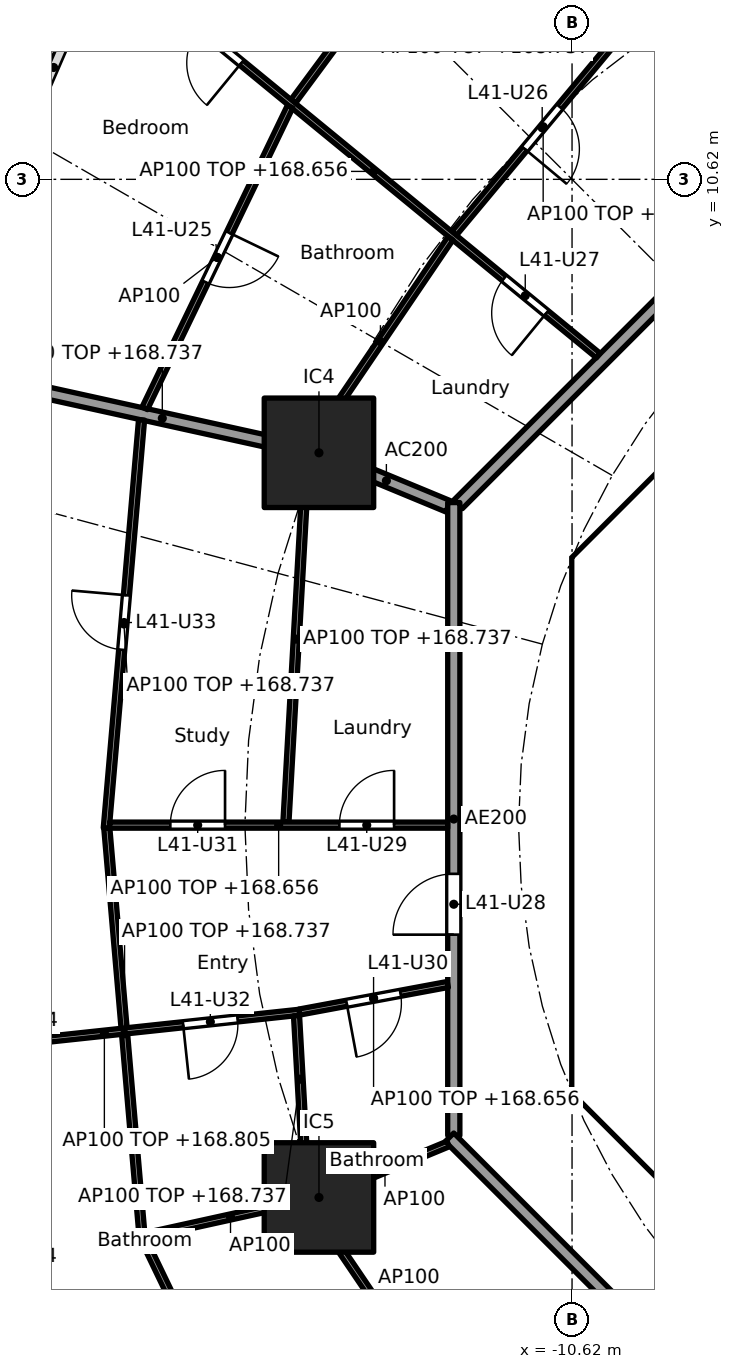
"""IFC4 building model, lengths in metres.
Left out: names, types, materials, properties, quantities, classifications, styles, units other than length and angle.
Written with IfcOpenShell. Run it as: python <this file> out.ifc"""

import sys

from ifc_helpers import new_model, si_unit, direction, frame, frame_2d, origin, origin_2d, place, context, subcontext, project, spatial, polyline, rectangle, outline, extrude, element, fill, save


model = new_model("IFC4")
c1 = context("Model", 3, precision=1e-05, world=origin(), true_north=direction((0.0, 1.0)))
c2 = subcontext(c1, "Body", "Model", "MODEL_VIEW")
j1 = project(units=[si_unit("LENGTHUNIT", "METRE"), si_unit("PLANEANGLEUNIT", "RADIAN")], contexts=[c1])
p1 = place(None, origin())
s1 = spatial("IfcSite", under=j1, at=p1, CompositionType="ELEMENT")
p2 = place(p1, origin())
s2 = spatial("IfcBuilding", under=s1, at=p2, CompositionType="ELEMENT")
p3 = place(p2, frame((0.0, 0.0, 165.9)))
s3 = spatial("IfcBuildingStorey", under=s2, at=p3, CompositionType="ELEMENT", Elevation=165.9)
for number, where, z_axis, x_axis in (
    (1, (-14.782, 6.123, 0.0), (0.0, 0.0, 1.0), (1.0, 0.0, 0.0)),
    (2, (-14.782, -6.123, 0.0), (0.0, 0.0, 1.0), (1.0, 0.0, 0.0)),
):
    element("IfcColumn", number, at=place(p3, frame(where, z_axis=z_axis, x_axis=x_axis)), inside=s3, PredefinedType="COLUMN", context=c2, shape_type="SweptSolid", body=[
        extrude(rectangle(XDim=1.8, YDim=1.8, at=origin_2d()), origin(), (0.0, 0.0, 1.0), 3.7),
    ])
p4 = place(p3, frame((-18.227, 16.86, 0.0), z_axis=(0.0, 0.0, 1.0), x_axis=(-0.467931103726, -0.883764947351, 0.0)))
e3 = element("IfcWall", 3, at=p4, inside=s3, PredefinedType="SOLIDWALL", context=c2, shape_type="SweptSolid", body=[
    extrude(rectangle(XDim=5.947, YDim=1.6, at=frame_2d((2.973, 0.0))), origin(), (0.0, 0.0, 1.0), 1.1),
])
p5 = place(p3, frame((-4.613, 9.988, 0.0), z_axis=(0.0, 0.0, 1.0), x_axis=(-0.707106781187, -0.707106781187, 0.0)))
e4 = element("IfcWall", 4, at=p5, inside=s3, PredefinedType="SHEAR", context=c2, shape_type="SweptSolid", body=[
    extrude(rectangle(XDim=7.602, YDim=0.6, at=frame_2d((3.801, 0.0))), origin(), (0.0, 0.0, 1.0), 3.44),
])
p6 = place(p5, frame((0.351, 0.0, 0.0)))
e5 = element("IfcOpeningElement", 5, at=p6, cuts=e4, PredefinedType="OPENING", context=c2, shape_type="SweptSolid", body=[
    extrude(rectangle(XDim=1.1, YDim=2.1, at=frame_2d((0.55, 1.05))), frame((0.0, 0.31, 0.0), z_axis=(0.0, -1.0, 0.0), x_axis=(1.0, 0.0, 0.0)), (0.0, 0.0, 1.0), 0.62),
])
p7 = place(p3, frame((-10.325, 3.801, 0.0), z_axis=(0.0, 0.0, 1.0), x_axis=(0.0, -1.0, 0.0)))
e6 = element("IfcWall", 6, at=p7, inside=s3, PredefinedType="SHEAR", context=c2, shape_type="SweptSolid", body=[
    extrude(rectangle(XDim=7.602, YDim=0.6, at=frame_2d((3.801, 0.0))), origin(), (0.0, 0.0, 1.0), 3.44),
])
p8 = place(p7, frame((0.651, 0.0, 0.0)))
e7 = element("IfcOpeningElement", 7, at=p8, cuts=e6, PredefinedType="OPENING", context=c2, shape_type="SweptSolid", body=[
    extrude(rectangle(XDim=1.5, YDim=2.1, at=frame_2d((0.75, 1.05))), frame((0.0, 0.31, 0.0), z_axis=(0.0, -1.0, 0.0), x_axis=(1.0, 0.0, 0.0)), (0.0, 0.0, 1.0), 0.62),
])
p9 = place(p7, frame((5.451, 0.0, 0.0)))
e8 = element("IfcOpeningElement", 8, at=p9, cuts=e6, PredefinedType="OPENING", context=c2, shape_type="SweptSolid", body=[
    extrude(rectangle(XDim=1.5, YDim=2.1, at=frame_2d((0.75, 1.05))), frame((0.0, 0.31, 0.0), z_axis=(0.0, -1.0, 0.0), x_axis=(1.0, 0.0, 0.0)), (0.0, 0.0, 1.0), 0.62),
])
p10 = place(p3, frame((-9.988, -4.613, 0.0), z_axis=(0.0, 0.0, 1.0), x_axis=(0.707106781187, -0.707106781187, 0.0)))
e9 = element("IfcWall", 9, at=p10, inside=s3, PredefinedType="SHEAR", context=c2, shape_type="SweptSolid", body=[
    extrude(rectangle(XDim=7.602, YDim=0.6, at=frame_2d((3.801, 0.0))), origin(), (0.0, 0.0, 1.0), 3.44),
])
p11 = place(p10, frame((6.151, 0.0, 0.0)))
e10 = element("IfcOpeningElement", 10, at=p11, cuts=e9, PredefinedType="OPENING", context=c2, shape_type="SweptSolid", body=[
    extrude(rectangle(XDim=1.1, YDim=2.1, at=frame_2d((0.55, 1.05))), frame((0.0, 0.31, 0.0), z_axis=(0.0, -1.0, 0.0), x_axis=(1.0, 0.0, 0.0)), (0.0, 0.0, 1.0), 0.62),
])
p12 = place(p3, origin())
e11 = element("IfcWall", 11, at=p12, inside=s3, PredefinedType="SHEAR", context=c2, shape_type="SweptSolid", body=[
    extrude(outline(polyline([(-10.625, -3.801), (-10.025, -3.801), (-10.025, -4.152), (-9.776, -4.401), (-10.2, -4.825), (-10.625, -4.401), (-10.625, -3.801)])), origin(), (0.0, 0.0, 1.0), 3.44),
])
p13 = place(p3, origin())
e12 = element("IfcWall", 12, at=p13, inside=s3, PredefinedType="SHEAR", context=c2, shape_type="SweptSolid", body=[
    extrude(outline(polyline([(-10.2, 4.825), (-9.776, 4.401), (-10.025, 4.152), (-10.025, 3.801), (-10.625, 3.801), (-10.625, 4.401), (-10.2, 4.825)])), origin(), (0.0, 0.0, 1.0), 3.44),
])
for number, where, z_axis, x_axis in (
    (13, (-10.025, -4.0, 0.0), (0.0, 0.0, 1.0), (1.0, 0.0, 0.0)),
    (14, (-10.025, 4.0, 0.0), (0.0, 0.0, 1.0), (1.0, 0.0, 0.0)),
):
    element("IfcWall", number, at=place(p3, frame(where, z_axis=z_axis, x_axis=x_axis)), inside=s3, PredefinedType="PARTITIONING", context=c2, shape_type="SweptSolid", body=[
        extrude(rectangle(XDim=3.325, YDim=0.2, at=frame_2d((1.662, 0.0))), origin(), (0.0, 0.0, 1.0), 3.44),
    ])
p14 = place(p3, frame((-12.657, 5.243, 0.0), z_axis=(0.0, 0.0, 1.0), x_axis=(-0.923859888513, 0.38273085373, 0.0)))
e15 = element("IfcWall", 15, at=p14, inside=s3, PredefinedType="PARTITIONING", context=c2, shape_type="SweptSolid", body=[
    extrude(rectangle(XDim=2.199, YDim=0.2, at=frame_2d((1.1, 0.0))), origin(), (0.0, 0.0, 1.0), 3.44),
])
p15 = place(p3, frame((-14.831, 6.134, 0.0), z_axis=(0.0, 0.0, 1.0), x_axis=(-0.976568396888, 0.215207263354, 0.0)))
e16 = element("IfcWall", 16, at=p15, inside=s3, PredefinedType="PARTITIONING", context=c2, shape_type="SweptSolid", body=[
    extrude(rectangle(XDim=5.177, YDim=0.2, at=frame_2d((2.588, 0.0))), origin(), (0.0, 0.0, 1.0), 2.837),
])
p16 = place(p3, frame((-5.275, 12.494, 0.0), z_axis=(0.0, 0.0, 1.0), x_axis=(-0.707106781187, -0.707106781187, 0.0)))
e17 = element("IfcWall", 17, at=p16, inside=s3, PredefinedType="PARTITIONING", context=c2, shape_type="SweptSolid", body=[
    extrude(rectangle(XDim=10.209, YDim=0.2, at=frame_2d((5.104, 0.0))), origin(), (0.0, 0.0, 1.0), 3.44),
])
p17 = place(p3, frame((-12.565, 5.304, 0.0), z_axis=(0.0, 0.0, 1.0), x_axis=(0.0, -1.0, 0.0)))
e18 = element("IfcWall", 18, at=p17, inside=s3, PredefinedType="PARTITIONING", context=c2, shape_type="SweptSolid", body=[
    extrude(rectangle(XDim=10.409, YDim=0.2, at=frame_2d((5.205, 0.0))), origin(), (0.0, 0.0, 1.0), 3.44),
])
p18 = place(p17, frame((6.106, 0.0, 0.0)))
e19 = element("IfcOpeningElement", 19, at=p18, cuts=e18, PredefinedType="OPENING", context=c2, shape_type="SweptSolid", body=[
    extrude(rectangle(XDim=1.0, YDim=2.1, at=frame_2d((0.5, 1.05))), frame((0.0, 0.11, 0.0), z_axis=(0.0, -1.0, 0.0), x_axis=(1.0, 0.0, 0.0)), (0.0, 0.0, 1.0), 0.22),
])
p19 = place(p3, frame((-12.635, -5.134, 0.0), z_axis=(0.0, 0.0, 1.0), x_axis=(0.707106781187, -0.707106781187, 0.0)))
e20 = element("IfcWall", 20, at=p19, inside=s3, PredefinedType="PARTITIONING", context=c2, shape_type="SweptSolid", body=[
    extrude(rectangle(XDim=10.609, YDim=0.2, at=frame_2d((5.305, 0.0))), origin(), (0.0, 0.0, 1.0), 3.44),
])
p20 = place(p3, frame((-9.631, 13.242, 0.0), z_axis=(0.0, 0.0, 1.0), x_axis=(-0.640315711982, -0.768111833647, 0.0)))
e21 = element("IfcWall", 21, at=p20, inside=s3, PredefinedType="PARTITIONING", context=c2, shape_type="SweptSolid", body=[
    extrude(rectangle(XDim=4.572, YDim=0.1, at=frame_2d((2.286, 0.0))), origin(), (0.0, 0.0, 1.0), 2.837),
])
p21 = place(p20, frame((1.861, 0.0, 0.0)))
e22 = element("IfcOpeningElement", 22, at=p21, cuts=e21, PredefinedType="OPENING", context=c2, shape_type="SweptSolid", body=[
    extrude(rectangle(XDim=0.9, YDim=2.1, at=frame_2d((0.45, 1.05))), frame((0.0, 0.06, 0.0), z_axis=(0.0, -1.0, 0.0), x_axis=(1.0, 0.0, 0.0)), (0.0, 0.0, 1.0), 0.12),
])
p22 = place(p3, frame((-11.773, 16.542, 0.0), z_axis=(0.0, 0.0, 1.0), x_axis=(-0.594694305999, -0.803951915485, 0.0)))
e23 = element("IfcWall", 23, at=p22, inside=s3, PredefinedType="PARTITIONING", context=c2, shape_type="SweptSolid", body=[
    extrude(rectangle(XDim=5.772, YDim=0.1, at=frame_2d((2.886, 0.0))), origin(), (0.0, 0.0, 1.0), 2.837),
])
p23 = place(p22, frame((2.461, 0.0, 0.0)))
e24 = element("IfcOpeningElement", 24, at=p23, cuts=e23, PredefinedType="OPENING", context=c2, shape_type="SweptSolid", body=[
    extrude(rectangle(XDim=0.9, YDim=2.1, at=frame_2d((0.45, 1.05))), frame((0.0, 0.06, 0.0), z_axis=(0.0, -1.0, 0.0), x_axis=(1.0, 0.0, 0.0)), (0.0, 0.0, 1.0), 0.12),
])
p24 = place(p3, frame((-10.189, 7.721, 0.0), z_axis=(0.0, 0.0, 1.0), x_axis=(-0.773134429339, 0.634242188892, 0.0)))
e25 = element("IfcWall", 25, at=p24, inside=s3, PredefinedType="PARTITIONING", context=c2, shape_type="SweptSolid", body=[
    extrude(rectangle(XDim=9.552, YDim=0.1, at=frame_2d((4.776, 0.0))), origin(), (0.0, 0.0, 1.0), 2.756),
])
p25 = place(p24, frame((7.59, 0.0, 0.0)))
e26 = element("IfcOpeningElement", 26, at=p25, cuts=e25, PredefinedType="OPENING", context=c2, shape_type="SweptSolid", body=[
    extrude(rectangle(XDim=0.9, YDim=2.1, at=frame_2d((0.45, 1.05))), frame((0.0, 0.06, 0.0), z_axis=(0.0, -1.0, 0.0), x_axis=(1.0, 0.0, 0.0)), (0.0, 0.0, 1.0), 0.12),
])
p26 = place(p24, frame((1.104, 0.0, 0.0)))
e27 = element("IfcOpeningElement", 27, at=p26, cuts=e25, PredefinedType="OPENING", context=c2, shape_type="SweptSolid", body=[
    extrude(rectangle(XDim=0.9, YDim=2.1, at=frame_2d((0.45, 1.05))), frame((0.0, 0.06, 0.0), z_axis=(0.0, -1.0, 0.0), x_axis=(1.0, 0.0, 0.0)), (0.0, 0.0, 1.0), 0.12),
])
p27 = place(p3, frame((-12.619, 9.65, 0.0), z_axis=(0.0, 0.0, 1.0), x_axis=(-0.561046521684, -0.82778427172, 0.0)))
e28 = element("IfcWall", 28, at=p27, inside=s3, PredefinedType="PARTITIONING", context=c2, shape_type="SweptSolid", body=[
    extrude(rectangle(XDim=4.109, YDim=0.1, at=frame_2d((2.054, 0.0))), origin(), (0.0, 0.0, 1.0), 3.44),
])
p28 = place(p3, frame((-15.257, 11.816, 0.0), z_axis=(0.0, 0.0, 1.0), x_axis=(-0.434027506504, -0.900899619046, 0.0)))
e29 = element("IfcWall", 29, at=p28, inside=s3, PredefinedType="PARTITIONING", context=c2, shape_type="SweptSolid", body=[
    extrude(rectangle(XDim=5.508, YDim=0.1, at=frame_2d((2.754, 0.0))), origin(), (0.0, 0.0, 1.0), 3.44),
])
p29 = place(p28, frame((2.304, 0.0, 0.0)))
e30 = element("IfcOpeningElement", 30, at=p29, cuts=e29, PredefinedType="OPENING", context=c2, shape_type="SweptSolid", body=[
    extrude(rectangle(XDim=0.9, YDim=2.1, at=frame_2d((0.45, 1.05))), frame((0.0, 0.06, 0.0), z_axis=(0.0, -1.0, 0.0), x_axis=(1.0, 0.0, 0.0)), (0.0, 0.0, 1.0), 0.12),
])
p30 = place(p3, frame((-14.986, 6.067, 0.0), z_axis=(0.0, 0.0, 1.0), x_axis=(-0.056311398802, -0.998413254302, 0.0)))
e31 = element("IfcWall", 31, at=p30, inside=s3, PredefinedType="PARTITIONING", context=c2, shape_type="SweptSolid", body=[
    extrude(rectangle(XDim=6.026, YDim=0.1, at=frame_2d((3.013, 0.0))), origin(), (0.0, 0.0, 1.0), 2.837),
])
p31 = place(p3, frame((-17.7, 6.664, 0.0), z_axis=(0.0, 0.0, 1.0), x_axis=(-0.086004282666, -0.996294767307, 0.0)))
e32 = element("IfcWall", 32, at=p31, inside=s3, PredefinedType="PARTITIONING", context=c2, shape_type="SweptSolid", body=[
    extrude(rectangle(XDim=6.739, YDim=0.1, at=frame_2d((3.37, 0.0))), origin(), (0.0, 0.0, 1.0), 2.837),
])
p32 = place(p31, frame((2.895, 0.0, 0.0)))
e33 = element("IfcOpeningElement", 33, at=p32, cuts=e32, PredefinedType="OPENING", context=c2, shape_type="SweptSolid", body=[
    extrude(rectangle(XDim=0.9, YDim=2.1, at=frame_2d((0.45, 1.05))), frame((0.0, 0.06, 0.0), z_axis=(0.0, -1.0, 0.0), x_axis=(1.0, 0.0, 0.0)), (0.0, 0.0, 1.0), 0.12),
])
p33 = place(p3, frame((-12.665, 0.0, 0.0), z_axis=(0.0, 0.0, 1.0), x_axis=(-1.0, 0.0, 0.0)))
e34 = element("IfcWall", 34, at=p33, inside=s3, PredefinedType="PARTITIONING", context=c2, shape_type="SweptSolid", body=[
    extrude(rectangle(XDim=5.56, YDim=0.1, at=frame_2d((2.78, 0.0))), origin(), (0.0, 0.0, 1.0), 2.756),
])
p34 = place(p33, frame((0.882, 0.0, 0.0)))
e35 = element("IfcOpeningElement", 35, at=p34, cuts=e34, PredefinedType="OPENING", context=c2, shape_type="SweptSolid", body=[
    extrude(rectangle(XDim=0.9, YDim=2.1, at=frame_2d((0.45, 1.05))), frame((0.0, 0.06, 0.0), z_axis=(0.0, -1.0, 0.0), x_axis=(1.0, 0.0, 0.0)), (0.0, 0.0, 1.0), 0.12),
])
p35 = place(p33, frame((3.662, 0.0, 0.0)))
e36 = element("IfcOpeningElement", 36, at=p35, cuts=e34, PredefinedType="OPENING", context=c2, shape_type="SweptSolid", body=[
    extrude(rectangle(XDim=0.9, YDim=2.1, at=frame_2d((0.45, 1.05))), frame((0.0, 0.06, 0.0), z_axis=(0.0, -1.0, 0.0), x_axis=(1.0, 0.0, 0.0)), (0.0, 0.0, 1.0), 0.12),
])
p36 = place(p3, frame((-18.271, -0.05, 0.0), z_axis=(0.0, 0.0, 1.0), x_axis=(0.086018199227, -0.996293565874, 0.0)))
e37 = element("IfcWall", 37, at=p36, inside=s3, PredefinedType="PARTITIONING", context=c2, shape_type="SweptSolid", body=[
    extrude(rectangle(XDim=6.789, YDim=0.1, at=frame_2d((3.395, 0.0))), origin(), (0.0, 0.0, 1.0), 2.837),
])
p37 = place(p3, frame((-12.663, -2.621, 0.0), z_axis=(0.0, 0.0, 1.0), x_axis=(-0.983176884312, -0.182655999505, 0.0)))
e38 = element("IfcWall", 38, at=p37, inside=s3, PredefinedType="PARTITIONING", context=c2, shape_type="SweptSolid", body=[
    extrude(rectangle(XDim=2.483, YDim=0.1, at=frame_2d((1.242, 0.0))), origin(), (0.0, 0.0, 1.0), 2.756),
])
p38 = place(p37, frame((0.792, 0.0, 0.0)))
e39 = element("IfcOpeningElement", 39, at=p38, cuts=e38, PredefinedType="OPENING", context=c2, shape_type="SweptSolid", body=[
    extrude(rectangle(XDim=0.9, YDim=2.1, at=frame_2d((0.45, 1.05))), frame((0.0, 0.06, 0.0), z_axis=(0.0, -1.0, 0.0), x_axis=(1.0, 0.0, 0.0)), (0.0, 0.0, 1.0), 0.12),
])
p39 = place(p3, frame((-15.104, -3.078, 0.0), z_axis=(0.0, 0.0, 1.0), x_axis=(-0.994316167803, -0.106467640365, 0.0)))
e40 = element("IfcWall", 40, at=p39, inside=s3, PredefinedType="PARTITIONING", context=c2, shape_type="SweptSolid", body=[
    extrude(rectangle(XDim=6.45, YDim=0.1, at=frame_2d((3.225, 0.0))), origin(), (0.0, 0.0, 1.0), 2.905),
])
p40 = place(p39, frame((1.022, 0.0, 0.0)))
e41 = element("IfcOpeningElement", 41, at=p40, cuts=e40, PredefinedType="OPENING", context=c2, shape_type="SweptSolid", body=[
    extrude(rectangle(XDim=0.9, YDim=2.1, at=frame_2d((0.45, 1.05))), frame((0.0, 0.06, 0.0), z_axis=(0.0, -1.0, 0.0), x_axis=(1.0, 0.0, 0.0)), (0.0, 0.0, 1.0), 0.12),
])
p41 = place(p39, frame((4.223, 0.0, 0.0)))
e42 = element("IfcOpeningElement", 42, at=p41, cuts=e40, PredefinedType="OPENING", context=c2, shape_type="SweptSolid", body=[
    extrude(rectangle(XDim=0.9, YDim=2.1, at=frame_2d((0.45, 1.05))), frame((0.0, 0.06, 0.0), z_axis=(0.0, -1.0, 0.0), x_axis=(1.0, 0.0, 0.0)), (0.0, 0.0, 1.0), 0.12),
])
p42 = place(p3, frame((-15.151, -3.133, 0.0), z_axis=(0.0, 0.0, 1.0), x_axis=(0.05637501378, -0.998409664327, 0.0)))
e43 = element("IfcWall", 43, at=p42, inside=s3, PredefinedType="PARTITIONING", context=c2, shape_type="SweptSolid", body=[
    extrude(rectangle(XDim=2.988, YDim=0.1, at=frame_2d((1.494, 0.0))), origin(), (0.0, 0.0, 1.0), 2.837),
])
p43 = place(p3, frame((-12.657, -5.243, 0.0), z_axis=(0.0, 0.0, 1.0), x_axis=(-0.923848837015, -0.382757529444, 0.0)))
e44 = element("IfcWall", 44, at=p43, inside=s3, PredefinedType="PARTITIONING", context=c2, shape_type="SweptSolid", body=[
    extrude(rectangle(XDim=2.25, YDim=0.1, at=frame_2d((1.125, 0.0))), origin(), (0.0, 0.0, 1.0), 3.44),
])
p44 = place(p3, frame((-14.831, -6.134, 0.0), z_axis=(0.0, 0.0, 1.0), x_axis=(-0.976560749847, -0.215241961191, 0.0)))
e45 = element("IfcWall", 45, at=p44, inside=s3, PredefinedType="PARTITIONING", context=c2, shape_type="SweptSolid", body=[
    extrude(rectangle(XDim=2.879, YDim=0.1, at=frame_2d((1.439, 0.0))), origin(), (0.0, 0.0, 1.0), 3.44),
])
p45 = place(p3, frame((-14.952, -6.208, 0.0), z_axis=(0.0, 0.0, 1.0), x_axis=(0.561064907171, -0.827771810308, 0.0)))
e46 = element("IfcWall", 46, at=p45, inside=s3, PredefinedType="PARTITIONING", context=c2, shape_type="SweptSolid", body=[
    extrude(rectangle(XDim=4.159, YDim=0.1, at=frame_2d((2.079, 0.0))), origin(), (0.0, 0.0, 1.0), 3.44),
])
p46 = place(p3, frame((-17.669, -6.809, 0.0), z_axis=(0.0, 0.0, 1.0), x_axis=(0.434040130629, -0.900893536997, 0.0)))
e47 = element("IfcWall", 47, at=p46, inside=s3, PredefinedType="PARTITIONING", context=c2, shape_type="SweptSolid", body=[
    extrude(rectangle(XDim=5.558, YDim=0.1, at=frame_2d((2.779, 0.0))), origin(), (0.0, 0.0, 1.0), 3.44),
])
p47 = place(p46, frame((2.329, 0.0, 0.0)))
e48 = element("IfcOpeningElement", 48, at=p47, cuts=e47, PredefinedType="OPENING", context=c2, shape_type="SweptSolid", body=[
    extrude(rectangle(XDim=0.9, YDim=2.1, at=frame_2d((0.45, 1.05))), frame((0.0, 0.06, 0.0), z_axis=(0.0, -1.0, 0.0), x_axis=(1.0, 0.0, 0.0)), (0.0, 0.0, 1.0), 0.12),
])
p48 = place(p8, origin())
e49 = element("IfcDoor", 49, at=p48, inside=s3, OperationType="DOUBLE_DOOR_SINGLE_SWING", PredefinedType="DOOR", context=c2, shape_type="SweptSolid", body=[
    extrude(rectangle(XDim=1.5, YDim=2.1, at=frame_2d((0.75, 1.05))), frame((0.0, 0.025, 0.0), z_axis=(0.0, -1.0, 0.0), x_axis=(1.0, 0.0, 0.0)), (0.0, 0.0, 1.0), 0.05),
])
fill(e7, e49)
p49 = place(p9, origin())
e50 = element("IfcDoor", 50, at=p49, inside=s3, OperationType="DOUBLE_DOOR_SINGLE_SWING", PredefinedType="DOOR", context=c2, shape_type="SweptSolid", body=[
    extrude(rectangle(XDim=1.5, YDim=2.1, at=frame_2d((0.75, 1.05))), frame((0.0, 0.025, 0.0), z_axis=(0.0, -1.0, 0.0), x_axis=(1.0, 0.0, 0.0)), (0.0, 0.0, 1.0), 0.05),
])
fill(e8, e50)
p50 = place(p25, origin())
e51 = element("IfcDoor", 51, at=p50, inside=s3, OperationType="SINGLE_SWING_LEFT", PredefinedType="DOOR", context=c2, shape_type="SweptSolid", body=[
    extrude(rectangle(XDim=0.9, YDim=2.1, at=frame_2d((0.45, 1.05))), frame((0.0, 0.025, 0.0), z_axis=(0.0, -1.0, 0.0), x_axis=(1.0, 0.0, 0.0)), (0.0, 0.0, 1.0), 0.05),
])
fill(e26, e51)
p51 = place(p29, origin())
e52 = element("IfcDoor", 52, at=p51, inside=s3, OperationType="SINGLE_SWING_LEFT", PredefinedType="DOOR", context=c2, shape_type="SweptSolid", body=[
    extrude(rectangle(XDim=0.9, YDim=2.1, at=frame_2d((0.45, 1.05))), frame((0.0, 0.025, 0.0), z_axis=(0.0, -1.0, 0.0), x_axis=(1.0, 0.0, 0.0)), (0.0, 0.0, 1.0), 0.05),
])
fill(e30, e52)
p52 = place(p21, origin())
e53 = element("IfcDoor", 53, at=p52, inside=s3, OperationType="SINGLE_SWING_RIGHT", PredefinedType="DOOR", context=c2, shape_type="SweptSolid", body=[
    extrude(rectangle(XDim=0.9, YDim=2.1, at=frame_2d((0.45, 1.05))), frame((0.0, 0.025, 0.0), z_axis=(0.0, -1.0, 0.0), x_axis=(1.0, 0.0, 0.0)), (0.0, 0.0, 1.0), 0.05),
])
fill(e22, e53)
p53 = place(p26, origin())
e54 = element("IfcDoor", 54, at=p53, inside=s3, OperationType="SINGLE_SWING_LEFT", PredefinedType="DOOR", context=c2, shape_type="SweptSolid", body=[
    extrude(rectangle(XDim=0.9, YDim=2.1, at=frame_2d((0.45, 1.05))), frame((0.0, 0.025, 0.0), z_axis=(0.0, -1.0, 0.0), x_axis=(1.0, 0.0, 0.0)), (0.0, 0.0, 1.0), 0.05),
])
fill(e27, e54)
p54 = place(p18, frame((1.0, 0.0, 0.0), x_axis=(-1.0, 0.0, 0.0)))
e55 = element("IfcDoor", 55, at=p54, inside=s3, OperationType="SINGLE_SWING_LEFT", PredefinedType="DOOR", context=c2, shape_type="SweptSolid", body=[
    extrude(rectangle(XDim=1.0, YDim=2.1, at=frame_2d((0.5, 1.05))), frame((0.0, 0.025, 0.0), z_axis=(0.0, -1.0, 0.0), x_axis=(1.0, 0.0, 0.0)), (0.0, 0.0, 1.0), 0.05),
])
fill(e19, e55)
p55 = place(p34, frame((0.9, 0.0, 0.0), x_axis=(-1.0, 0.0, 0.0)))
e56 = element("IfcDoor", 56, at=p55, inside=s3, OperationType="SINGLE_SWING_RIGHT", PredefinedType="DOOR", context=c2, shape_type="SweptSolid", body=[
    extrude(rectangle(XDim=0.9, YDim=2.1, at=frame_2d((0.45, 1.05))), frame((0.0, 0.025, 0.0), z_axis=(0.0, -1.0, 0.0), x_axis=(1.0, 0.0, 0.0)), (0.0, 0.0, 1.0), 0.05),
])
fill(e35, e56)
p56 = place(p38, origin())
e57 = element("IfcDoor", 57, at=p56, inside=s3, OperationType="SINGLE_SWING_RIGHT", PredefinedType="DOOR", context=c2, shape_type="SweptSolid", body=[
    extrude(rectangle(XDim=0.9, YDim=2.1, at=frame_2d((0.45, 1.05))), frame((0.0, 0.025, 0.0), z_axis=(0.0, -1.0, 0.0), x_axis=(1.0, 0.0, 0.0)), (0.0, 0.0, 1.0), 0.05),
])
fill(e39, e57)
p57 = place(p35, frame((0.9, 0.0, 0.0), x_axis=(-1.0, 0.0, 0.0)))
e58 = element("IfcDoor", 58, at=p57, inside=s3, OperationType="SINGLE_SWING_RIGHT", PredefinedType="DOOR", context=c2, shape_type="SweptSolid", body=[
    extrude(rectangle(XDim=0.9, YDim=2.1, at=frame_2d((0.45, 1.05))), frame((0.0, 0.025, 0.0), z_axis=(0.0, -1.0, 0.0), x_axis=(1.0, 0.0, 0.0)), (0.0, 0.0, 1.0), 0.05),
])
fill(e36, e58)
p58 = place(p40, origin())
e59 = element("IfcDoor", 59, at=p58, inside=s3, OperationType="SINGLE_SWING_RIGHT", PredefinedType="DOOR", context=c2, shape_type="SweptSolid", body=[
    extrude(rectangle(XDim=0.9, YDim=2.1, at=frame_2d((0.45, 1.05))), frame((0.0, 0.025, 0.0), z_axis=(0.0, -1.0, 0.0), x_axis=(1.0, 0.0, 0.0)), (0.0, 0.0, 1.0), 0.05),
])
fill(e41, e59)
p59 = place(p32, frame((0.9, 0.0, 0.0), x_axis=(-1.0, 0.0, 0.0)))
e60 = element("IfcDoor", 60, at=p59, inside=s3, OperationType="SINGLE_SWING_RIGHT", PredefinedType="DOOR", context=c2, shape_type="SweptSolid", body=[
    extrude(rectangle(XDim=0.9, YDim=2.1, at=frame_2d((0.45, 1.05))), frame((0.0, 0.025, 0.0), z_axis=(0.0, -1.0, 0.0), x_axis=(1.0, 0.0, 0.0)), (0.0, 0.0, 1.0), 0.05),
])
fill(e33, e60)
save(model, sys.argv[1])
